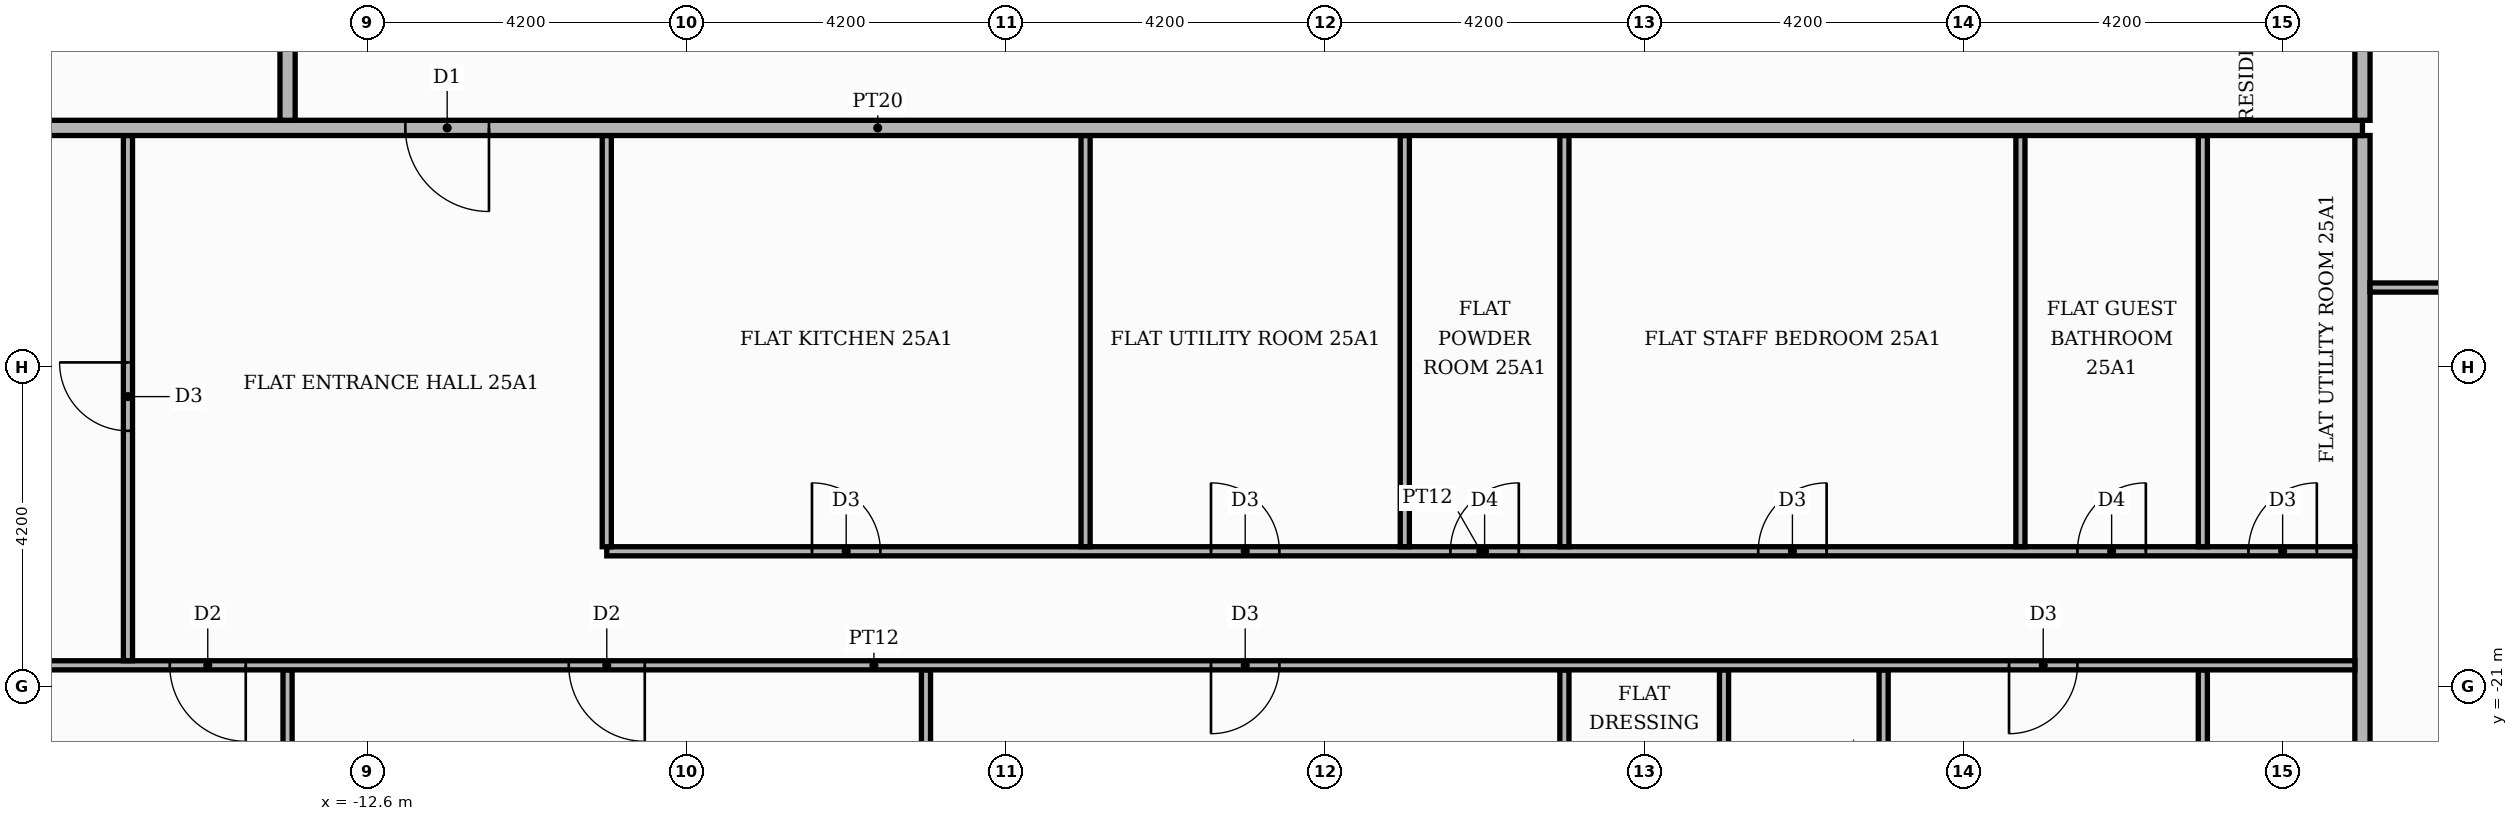
"""IFC4 building model, lengths in metres.
Left out: names, types, materials, properties, quantities, classifications, styles, units other than length and angle.
Written with IfcOpenShell. Run it as: python <this file> out.ifc"""

import sys

from ifc_helpers import new_model, si_unit, direction, frame, frame_2d, origin, place, context, subcontext, project, spatial, rectangle, extrude, element, fill, save


model = new_model("IFC4")
c1 = context("Model", 3, precision=1e-05, world=origin(), true_north=direction((0.0, 1.0)))
c2 = subcontext(c1, "Body", "Model", "MODEL_VIEW")
j1 = project(units=[si_unit("LENGTHUNIT", "METRE"), si_unit("PLANEANGLEUNIT", "RADIAN")], contexts=[c1])
p1 = place(None, origin())
s1 = spatial("IfcSite", under=j1, at=p1, CompositionType="ELEMENT")
p2 = place(p1, origin())
s2 = spatial("IfcBuilding", under=s1, at=p2, CompositionType="ELEMENT")
p3 = place(p2, frame((0.0, 0.0, 106.5)))
s3 = spatial("IfcBuildingStorey", under=s2, at=p3, CompositionType="ELEMENT", Elevation=106.5)
for number, where, z_axis, x_axis in (
    (1, (-13.65, -25.42, 0.0), (0.0, 0.0, 1.0), (0.0, 1.0, 0.0)),
    (2, (-5.25, -25.42, 0.0), (0.0, 0.0, 1.0), (0.0, 1.0, 0.0)),
):
    element("IfcWall", number, at=place(p3, frame(where, z_axis=z_axis, x_axis=x_axis)), inside=s3, PredefinedType="PARTITIONING", context=c2, shape_type="SweptSolid", body=[
        extrude(rectangle(XDim=4.64, YDim=0.12, at=frame_2d((2.32, 0.0))), origin(), (0.0, 0.0, 1.0), 3.48),
    ])
p4 = place(p3, frame((3.15, -25.42, 0.0), z_axis=(0.0, 0.0, 1.0), x_axis=(0.0, 1.0, 0.0)))
e3 = element("IfcWall", 3, at=p4, inside=s3, PredefinedType="PARTITIONING", context=c2, shape_type="SweptSolid", body=[
    extrude(rectangle(XDim=4.64, YDim=0.12, at=frame_2d((2.32, 0.0))), origin(), (0.0, 0.0, 1.0), 3.48),
])
p5 = place(p4, frame((1.75, 0.0, 0.0)))
e4 = element("IfcOpeningElement", 4, at=p5, cuts=e3, PredefinedType="OPENING", context=c2, shape_type="SweptSolid", body=[
    extrude(rectangle(XDim=0.9, YDim=2.1, at=frame_2d((0.45, 1.05))), frame((0.0, 0.07, 0.0), z_axis=(0.0, -1.0, 0.0), x_axis=(1.0, 0.0, 0.0)), (0.0, 0.0, 1.0), 0.14),
])
p6 = place(p3, frame((5.25, -25.42, 0.0), z_axis=(0.0, 0.0, 1.0), x_axis=(0.0, 1.0, 0.0)))
e5 = element("IfcWall", 5, at=p6, inside=s3, PredefinedType="PARTITIONING", context=c2, shape_type="SweptSolid", body=[
    extrude(rectangle(XDim=4.64, YDim=0.12, at=frame_2d((2.32, 0.0))), origin(), (0.0, 0.0, 1.0), 3.48),
])
p7 = place(p6, frame((1.75, 0.0, 0.0)))
e6 = element("IfcOpeningElement", 6, at=p7, cuts=e5, PredefinedType="OPENING", context=c2, shape_type="SweptSolid", body=[
    extrude(rectangle(XDim=0.9, YDim=2.1, at=frame_2d((0.45, 1.05))), frame((0.0, 0.07, 0.0), z_axis=(0.0, -1.0, 0.0), x_axis=(1.0, 0.0, 0.0)), (0.0, 0.0, 1.0), 0.14),
])
p8 = place(p3, frame((7.35, -25.42, 0.0), z_axis=(0.0, 0.0, 1.0), x_axis=(0.0, 1.0, 0.0)))
e7 = element("IfcWall", 7, at=p8, inside=s3, PredefinedType="PARTITIONING", context=c2, shape_type="SweptSolid", body=[
    extrude(rectangle(XDim=4.64, YDim=0.12, at=frame_2d((2.32, 0.0))), origin(), (0.0, 0.0, 1.0), 3.48),
])
p9 = place(p3, frame((11.55, -25.42, 0.0), z_axis=(0.0, 0.0, 1.0), x_axis=(0.0, 1.0, 0.0)))
e8 = element("IfcWall", 8, at=p9, inside=s3, PredefinedType="PARTITIONING", context=c2, shape_type="SweptSolid", body=[
    extrude(rectangle(XDim=4.64, YDim=0.12, at=frame_2d((2.32, 0.0))), origin(), (0.0, 0.0, 1.0), 3.48),
])
p10 = place(p9, frame((1.75, 0.0, 0.0)))
e9 = element("IfcOpeningElement", 9, at=p10, cuts=e8, PredefinedType="OPENING", context=c2, shape_type="SweptSolid", body=[
    extrude(rectangle(XDim=0.9, YDim=2.1, at=frame_2d((0.45, 1.05))), frame((0.0, 0.07, 0.0), z_axis=(0.0, -1.0, 0.0), x_axis=(1.0, 0.0, 0.0)), (0.0, 0.0, 1.0), 0.14),
])
p11 = place(p3, frame((13.65, -25.42, 0.0), z_axis=(0.0, 0.0, 1.0), x_axis=(0.0, 1.0, 0.0)))
e10 = element("IfcWall", 10, at=p11, inside=s3, PredefinedType="PARTITIONING", context=c2, shape_type="SweptSolid", body=[
    extrude(rectangle(XDim=11.67, YDim=0.2, at=frame_2d((5.835, 0.0))), origin(), (0.0, 0.0, 1.0), 3.48),
])
p12 = place(p3, frame((-25.42, -20.72, 0.0), z_axis=(0.0, 0.0, 1.0), x_axis=(1.0, 0.0, 0.0)))
e11 = element("IfcWall", 11, at=p12, inside=s3, PredefinedType="PARTITIONING", context=c2, shape_type="SweptSolid", body=[
    extrude(rectangle(XDim=38.97, YDim=0.12, at=frame_2d((19.485, 0.0))), origin(), (0.0, 0.0, 1.0), 3.48),
])
p13 = place(p12, frame((10.22, 0.0, 0.0)))
e12 = element("IfcOpeningElement", 12, at=p13, cuts=e11, PredefinedType="OPENING", context=c2, shape_type="SweptSolid", body=[
    extrude(rectangle(XDim=1.0, YDim=2.1, at=frame_2d((0.5, 1.05))), frame((0.0, 0.07, 0.0), z_axis=(0.0, -1.0, 0.0), x_axis=(1.0, 0.0, 0.0)), (0.0, 0.0, 1.0), 0.14),
])
p14 = place(p12, frame((15.47, 0.0, 0.0)))
e13 = element("IfcOpeningElement", 13, at=p14, cuts=e11, PredefinedType="OPENING", context=c2, shape_type="SweptSolid", body=[
    extrude(rectangle(XDim=1.0, YDim=2.1, at=frame_2d((0.5, 1.05))), frame((0.0, 0.07, 0.0), z_axis=(0.0, -1.0, 0.0), x_axis=(1.0, 0.0, 0.0)), (0.0, 0.0, 1.0), 0.14),
])
p15 = place(p12, frame((23.92, 0.0, 0.0)))
e14 = element("IfcOpeningElement", 14, at=p15, cuts=e11, PredefinedType="OPENING", context=c2, shape_type="SweptSolid", body=[
    extrude(rectangle(XDim=0.9, YDim=2.1, at=frame_2d((0.45, 1.05))), frame((0.0, 0.07, 0.0), z_axis=(0.0, -1.0, 0.0), x_axis=(1.0, 0.0, 0.0)), (0.0, 0.0, 1.0), 0.14),
])
p16 = place(p12, frame((34.42, 0.0, 0.0)))
e15 = element("IfcOpeningElement", 15, at=p16, cuts=e11, PredefinedType="OPENING", context=c2, shape_type="SweptSolid", body=[
    extrude(rectangle(XDim=0.9, YDim=2.1, at=frame_2d((0.45, 1.05))), frame((0.0, 0.07, 0.0), z_axis=(0.0, -1.0, 0.0), x_axis=(1.0, 0.0, 0.0)), (0.0, 0.0, 1.0), 0.14),
])
p17 = place(p3, frame((-15.75, -20.66, 0.0), z_axis=(0.0, 0.0, 1.0), x_axis=(0.0, 1.0, 0.0)))
e16 = element("IfcWall", 16, at=p17, inside=s3, PredefinedType="PARTITIONING", context=c2, shape_type="SweptSolid", body=[
    extrude(rectangle(XDim=6.91, YDim=0.12, at=frame_2d((3.455, 0.0))), origin(), (0.0, 0.0, 1.0), 3.48),
])
p18 = place(p17, frame((3.025, 0.0, 0.0)))
e17 = element("IfcOpeningElement", 17, at=p18, cuts=e16, PredefinedType="OPENING", context=c2, shape_type="SweptSolid", body=[
    extrude(rectangle(XDim=0.9, YDim=2.1, at=frame_2d((0.45, 1.05))), frame((0.0, 0.07, 0.0), z_axis=(0.0, -1.0, 0.0), x_axis=(1.0, 0.0, 0.0)), (0.0, 0.0, 1.0), 0.14),
])
p19 = place(p3, frame((-9.45, -19.22, 0.0), z_axis=(0.0, 0.0, 1.0), x_axis=(1.0, 0.0, 0.0)))
e18 = element("IfcWall", 18, at=p19, inside=s3, PredefinedType="PARTITIONING", context=c2, shape_type="SweptSolid", body=[
    extrude(rectangle(XDim=23.0, YDim=0.12, at=frame_2d((11.5, 0.0))), origin(), (0.0, 0.0, 1.0), 3.48),
])
p20 = place(p19, frame((2.7, 0.0, 0.0)))
e19 = element("IfcOpeningElement", 19, at=p20, cuts=e18, PredefinedType="OPENING", context=c2, shape_type="SweptSolid", body=[
    extrude(rectangle(XDim=0.9, YDim=2.1, at=frame_2d((0.45, 1.05))), frame((0.0, 0.07, 0.0), z_axis=(0.0, -1.0, 0.0), x_axis=(1.0, 0.0, 0.0)), (0.0, 0.0, 1.0), 0.14),
])
p21 = place(p19, frame((7.95, 0.0, 0.0)))
e20 = element("IfcOpeningElement", 20, at=p21, cuts=e18, PredefinedType="OPENING", context=c2, shape_type="SweptSolid", body=[
    extrude(rectangle(XDim=0.9, YDim=2.1, at=frame_2d((0.45, 1.05))), frame((0.0, 0.07, 0.0), z_axis=(0.0, -1.0, 0.0), x_axis=(1.0, 0.0, 0.0)), (0.0, 0.0, 1.0), 0.14),
])
p22 = place(p19, frame((11.1, 0.0, 0.0)))
e21 = element("IfcOpeningElement", 21, at=p22, cuts=e18, PredefinedType="OPENING", context=c2, shape_type="SweptSolid", body=[
    extrude(rectangle(XDim=0.9, YDim=2.1, at=frame_2d((0.45, 1.05))), frame((0.0, 0.07, 0.0), z_axis=(0.0, -1.0, 0.0), x_axis=(1.0, 0.0, 0.0)), (0.0, 0.0, 1.0), 0.14),
])
p23 = place(p19, frame((15.15, 0.0, 0.0)))
e22 = element("IfcOpeningElement", 22, at=p23, cuts=e18, PredefinedType="OPENING", context=c2, shape_type="SweptSolid", body=[
    extrude(rectangle(XDim=0.9, YDim=2.1, at=frame_2d((0.45, 1.05))), frame((0.0, 0.07, 0.0), z_axis=(0.0, -1.0, 0.0), x_axis=(1.0, 0.0, 0.0)), (0.0, 0.0, 1.0), 0.14),
])
p24 = place(p19, frame((19.35, 0.0, 0.0)))
e23 = element("IfcOpeningElement", 23, at=p24, cuts=e18, PredefinedType="OPENING", context=c2, shape_type="SweptSolid", body=[
    extrude(rectangle(XDim=0.9, YDim=2.1, at=frame_2d((0.45, 1.05))), frame((0.0, 0.07, 0.0), z_axis=(0.0, -1.0, 0.0), x_axis=(1.0, 0.0, 0.0)), (0.0, 0.0, 1.0), 0.14),
])
p25 = place(p19, frame((21.6, 0.0, 0.0)))
e24 = element("IfcOpeningElement", 24, at=p25, cuts=e18, PredefinedType="OPENING", context=c2, shape_type="SweptSolid", body=[
    extrude(rectangle(XDim=0.9, YDim=2.1, at=frame_2d((0.45, 1.05))), frame((0.0, 0.07, 0.0), z_axis=(0.0, -1.0, 0.0), x_axis=(1.0, 0.0, 0.0)), (0.0, 0.0, 1.0), 0.14),
])
for number, where, z_axis, x_axis in (
    (25, (-9.45, -19.16, 0.0), (0.0, 0.0, 1.0), (0.0, 1.0, 0.0)),
    (26, (-3.15, -19.16, 0.0), (0.0, 0.0, 1.0), (0.0, 1.0, 0.0)),
    (27, (1.05, -19.16, 0.0), (0.0, 0.0, 1.0), (0.0, 1.0, 0.0)),
    (28, (3.15, -19.16, 0.0), (0.0, 0.0, 1.0), (0.0, 1.0, 0.0)),
    (29, (9.15, -19.16, 0.0), (0.0, 0.0, 1.0), (0.0, 1.0, 0.0)),
    (30, (11.55, -19.16, 0.0), (0.0, 0.0, 1.0), (0.0, 1.0, 0.0)),
):
    element("IfcWall", number, at=place(p3, frame(where, z_axis=z_axis, x_axis=x_axis)), inside=s3, PredefinedType="PARTITIONING", context=c2, shape_type="SweptSolid", body=[
        extrude(rectangle(XDim=5.41, YDim=0.12, at=frame_2d((2.705, 0.0))), origin(), (0.0, 0.0, 1.0), 3.48),
    ])
p26 = place(p3, frame((13.75, -15.75, 0.0), z_axis=(0.0, 0.0, 1.0), x_axis=(1.0, 0.0, 0.0)))
e31 = element("IfcWall", 31, at=p26, inside=s3, PredefinedType="PARTITIONING", context=c2, shape_type="SweptSolid", body=[
    extrude(rectangle(XDim=6.37, YDim=0.12, at=frame_2d((3.185, 0.0))), origin(), (0.0, 0.0, 1.0), 3.48),
])
p27 = place(p26, frame((2.635, 0.0, 0.0)))
e32 = element("IfcOpeningElement", 32, at=p27, cuts=e31, PredefinedType="OPENING", context=c2, shape_type="SweptSolid", body=[
    extrude(rectangle(XDim=1.0, YDim=2.1, at=frame_2d((0.5, 1.05))), frame((0.0, 0.07, 0.0), z_axis=(0.0, -1.0, 0.0), x_axis=(1.0, 0.0, 0.0)), (0.0, 0.0, 1.0), 0.14),
])
p28 = place(p3, frame((-25.42, -13.65, 0.0), z_axis=(0.0, 0.0, 1.0), x_axis=(1.0, 0.0, 0.0)))
e33 = element("IfcWall", 33, at=p28, inside=s3, PredefinedType="PARTITIONING", context=c2, shape_type="SweptSolid", body=[
    extrude(rectangle(XDim=39.07, YDim=0.2, at=frame_2d((19.535, 0.0))), origin(), (0.0, 0.0, 1.0), 3.48),
])
p29 = place(p28, frame((13.32, 0.0, 0.0)))
e34 = element("IfcOpeningElement", 34, at=p29, cuts=e33, PredefinedType="OPENING", context=c2, shape_type="SweptSolid", body=[
    extrude(rectangle(XDim=1.1, YDim=2.4, at=frame_2d((0.55, 1.2))), frame((0.0, 0.11, 0.0), z_axis=(0.0, -1.0, 0.0), x_axis=(1.0, 0.0, 0.0)), (0.0, 0.0, 1.0), 0.22),
])
p30 = place(p3, frame((-13.65, -13.55, 0.0), z_axis=(0.0, 0.0, 1.0), x_axis=(0.0, 1.0, 0.0)))
e35 = element("IfcWall", 35, at=p30, inside=s3, PredefinedType="PARTITIONING", context=c2, shape_type="SweptSolid", body=[
    extrude(rectangle(XDim=27.1, YDim=0.2, at=frame_2d((13.55, 0.0))), origin(), (0.0, 0.0, 1.0), 3.48),
])
p31 = place(p30, frame((24.55, 0.0, 0.0)))
e36 = element("IfcOpeningElement", 36, at=p31, cuts=e35, PredefinedType="OPENING", context=c2, shape_type="SweptSolid", body=[
    extrude(rectangle(XDim=1.1, YDim=2.4, at=frame_2d((0.55, 1.2))), frame((0.0, 0.11, 0.0), z_axis=(0.0, -1.0, 0.0), x_axis=(1.0, 0.0, 0.0)), (0.0, 0.0, 1.0), 0.22),
])
p32 = place(p3, frame((13.65, -13.55, 0.0), z_axis=(0.0, 0.0, 1.0), x_axis=(0.0, 1.0, 0.0)))
e37 = element("IfcWall", 37, at=p32, inside=s3, PredefinedType="PARTITIONING", context=c2, shape_type="SweptSolid", body=[
    extrude(rectangle(XDim=8.2, YDim=0.2, at=frame_2d((4.1, 0.0))), origin(), (0.0, 0.0, 1.0), 3.48),
])
p33 = place(p32, frame((1.45, 0.0, 0.0)))
e38 = element("IfcOpeningElement", 38, at=p33, cuts=e37, PredefinedType="OPENING", context=c2, shape_type="SweptSolid", body=[
    extrude(rectangle(XDim=1.1, YDim=2.4, at=frame_2d((0.55, 1.2))), frame((0.0, 0.11, 0.0), z_axis=(0.0, -1.0, 0.0), x_axis=(1.0, 0.0, 0.0)), (0.0, 0.0, 1.0), 0.22),
])
p34 = place(p29, frame((1.1, 0.0, 0.0), z_axis=(0.0, 0.0, 1.0), x_axis=(-1.0, 0.0, 0.0)))
e39 = element("IfcDoor", 39, at=p34, inside=s3, OperationType="SINGLE_SWING_RIGHT", PredefinedType="DOOR", context=c2, shape_type="SweptSolid", body=[
    extrude(rectangle(XDim=1.1, YDim=2.4, at=frame_2d((0.55, 1.2))), frame((0.0, 0.025, 0.0), z_axis=(0.0, -1.0, 0.0), x_axis=(1.0, 0.0, 0.0)), (0.0, 0.0, 1.0), 0.05),
])
fill(e34, e39)
p35 = place(p18, origin())
e40 = element("IfcDoor", 40, at=p35, inside=s3, OperationType="SINGLE_SWING_RIGHT", PredefinedType="DOOR", context=c2, shape_type="SweptSolid", body=[
    extrude(rectangle(XDim=0.9, YDim=2.1, at=frame_2d((0.45, 1.05))), frame((0.0, 0.025, 0.0), z_axis=(0.0, -1.0, 0.0), x_axis=(1.0, 0.0, 0.0)), (0.0, 0.0, 1.0), 0.05),
])
fill(e17, e40)
p36 = place(p20, origin())
e41 = element("IfcDoor", 41, at=p36, inside=s3, OperationType="SINGLE_SWING_LEFT", PredefinedType="DOOR", context=c2, shape_type="SweptSolid", body=[
    extrude(rectangle(XDim=0.9, YDim=2.1, at=frame_2d((0.45, 1.05))), frame((0.0, 0.025, 0.0), z_axis=(0.0, -1.0, 0.0), x_axis=(1.0, 0.0, 0.0)), (0.0, 0.0, 1.0), 0.05),
])
fill(e19, e41)
p37 = place(p21, origin())
e42 = element("IfcDoor", 42, at=p37, inside=s3, OperationType="SINGLE_SWING_LEFT", PredefinedType="DOOR", context=c2, shape_type="SweptSolid", body=[
    extrude(rectangle(XDim=0.9, YDim=2.1, at=frame_2d((0.45, 1.05))), frame((0.0, 0.025, 0.0), z_axis=(0.0, -1.0, 0.0), x_axis=(1.0, 0.0, 0.0)), (0.0, 0.0, 1.0), 0.05),
])
fill(e20, e42)
p38 = place(p22, origin())
e43 = element("IfcDoor", 43, at=p38, inside=s3, OperationType="SINGLE_SWING_RIGHT", PredefinedType="DOOR", context=c2, shape_type="SweptSolid", body=[
    extrude(rectangle(XDim=0.9, YDim=2.1, at=frame_2d((0.45, 1.05))), frame((0.0, 0.025, 0.0), z_axis=(0.0, -1.0, 0.0), x_axis=(1.0, 0.0, 0.0)), (0.0, 0.0, 1.0), 0.05),
])
fill(e21, e43)
p39 = place(p23, origin())
e44 = element("IfcDoor", 44, at=p39, inside=s3, OperationType="SINGLE_SWING_RIGHT", PredefinedType="DOOR", context=c2, shape_type="SweptSolid", body=[
    extrude(rectangle(XDim=0.9, YDim=2.1, at=frame_2d((0.45, 1.05))), frame((0.0, 0.025, 0.0), z_axis=(0.0, -1.0, 0.0), x_axis=(1.0, 0.0, 0.0)), (0.0, 0.0, 1.0), 0.05),
])
fill(e22, e44)
p40 = place(p24, origin())
e45 = element("IfcDoor", 45, at=p40, inside=s3, OperationType="SINGLE_SWING_RIGHT", PredefinedType="DOOR", context=c2, shape_type="SweptSolid", body=[
    extrude(rectangle(XDim=0.9, YDim=2.1, at=frame_2d((0.45, 1.05))), frame((0.0, 0.025, 0.0), z_axis=(0.0, -1.0, 0.0), x_axis=(1.0, 0.0, 0.0)), (0.0, 0.0, 1.0), 0.05),
])
fill(e23, e45)
p41 = place(p25, origin())
e46 = element("IfcDoor", 46, at=p41, inside=s3, OperationType="SINGLE_SWING_RIGHT", PredefinedType="DOOR", context=c2, shape_type="SweptSolid", body=[
    extrude(rectangle(XDim=0.9, YDim=2.1, at=frame_2d((0.45, 1.05))), frame((0.0, 0.025, 0.0), z_axis=(0.0, -1.0, 0.0), x_axis=(1.0, 0.0, 0.0)), (0.0, 0.0, 1.0), 0.05),
])
fill(e24, e46)
p42 = place(p13, frame((1.0, 0.0, 0.0), z_axis=(0.0, 0.0, 1.0), x_axis=(-1.0, 0.0, 0.0)))
e47 = element("IfcDoor", 47, at=p42, inside=s3, OperationType="SINGLE_SWING_RIGHT", PredefinedType="DOOR", context=c2, shape_type="SweptSolid", body=[
    extrude(rectangle(XDim=1.0, YDim=2.1, at=frame_2d((0.5, 1.05))), frame((0.0, 0.025, 0.0), z_axis=(0.0, -1.0, 0.0), x_axis=(1.0, 0.0, 0.0)), (0.0, 0.0, 1.0), 0.05),
])
fill(e12, e47)
p43 = place(p14, frame((1.0, 0.0, 0.0), z_axis=(0.0, 0.0, 1.0), x_axis=(-1.0, 0.0, 0.0)))
e48 = element("IfcDoor", 48, at=p43, inside=s3, OperationType="SINGLE_SWING_RIGHT", PredefinedType="DOOR", context=c2, shape_type="SweptSolid", body=[
    extrude(rectangle(XDim=1.0, YDim=2.1, at=frame_2d((0.5, 1.05))), frame((0.0, 0.025, 0.0), z_axis=(0.0, -1.0, 0.0), x_axis=(1.0, 0.0, 0.0)), (0.0, 0.0, 1.0), 0.05),
])
fill(e13, e48)
p44 = place(p15, frame((0.9, 0.0, 0.0), z_axis=(0.0, 0.0, 1.0), x_axis=(-1.0, 0.0, 0.0)))
e49 = element("IfcDoor", 49, at=p44, inside=s3, OperationType="SINGLE_SWING_LEFT", PredefinedType="DOOR", context=c2, shape_type="SweptSolid", body=[
    extrude(rectangle(XDim=0.9, YDim=2.1, at=frame_2d((0.45, 1.05))), frame((0.0, 0.025, 0.0), z_axis=(0.0, -1.0, 0.0), x_axis=(1.0, 0.0, 0.0)), (0.0, 0.0, 1.0), 0.05),
])
fill(e14, e49)
p45 = place(p16, frame((0.9, 0.0, 0.0), z_axis=(0.0, 0.0, 1.0), x_axis=(-1.0, 0.0, 0.0)))
e50 = element("IfcDoor", 50, at=p45, inside=s3, OperationType="SINGLE_SWING_LEFT", PredefinedType="DOOR", context=c2, shape_type="SweptSolid", body=[
    extrude(rectangle(XDim=0.9, YDim=2.1, at=frame_2d((0.45, 1.05))), frame((0.0, 0.025, 0.0), z_axis=(0.0, -1.0, 0.0), x_axis=(1.0, 0.0, 0.0)), (0.0, 0.0, 1.0), 0.05),
])
fill(e15, e50)
save(model, sys.argv[1])
